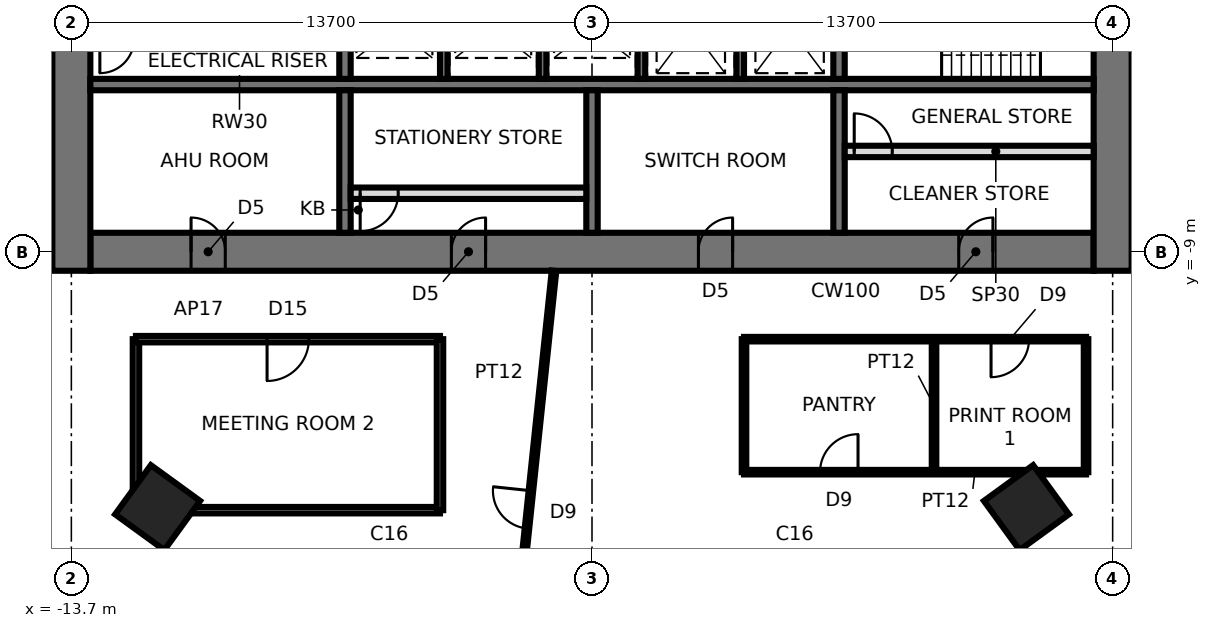
"""IFC4 building model, lengths in metres.
Left out: names, types, materials, properties, quantities, classifications, styles, units other than length and angle.
Written with IfcOpenShell. Run it as: python <this file> out.ifc"""

import sys

from ifc_helpers import new_model, si_unit, direction, frame, frame_2d, origin, origin_2d, place, context, subcontext, project, spatial, rectangle, extrude, element, fill, save


model = new_model("IFC4")
c1 = context("Model", 3, precision=1e-05, world=origin(), true_north=direction((0.0, 1.0)))
c2 = subcontext(c1, "Body", "Model", "MODEL_VIEW")
j1 = project(units=[si_unit("LENGTHUNIT", "METRE"), si_unit("PLANEANGLEUNIT", "RADIAN")], contexts=[c1])
p1 = place(None, origin())
s1 = spatial("IfcSite", under=j1, at=p1, CompositionType="ELEMENT")
p2 = place(p1, origin())
s2 = spatial("IfcBuilding", under=s1, at=p2, CompositionType="ELEMENT")
p3 = place(p2, frame((0.0, 0.0, 92.4)))
s3 = spatial("IfcBuildingStorey", under=s2, at=p3, CompositionType="ELEMENT", Elevation=92.4)
for number, where, z_axis, x_axis in (
    (1, (-11.43, -15.733, 0.0), (0.0, 0.0, 1.0), (-0.588, -0.809, 0.0)),
    (2, (11.43, -15.733, 0.0), (0.0, 0.0, 1.0), (0.588, -0.809, 0.0)),
):
    element("IfcColumn", number, at=place(p3, frame(where, z_axis=z_axis, x_axis=x_axis)), inside=s3, PredefinedType="COLUMN", context=c2, shape_type="SweptSolid", body=[
        extrude(rectangle(XDim=1.6, YDim=1.6, at=origin_2d()), origin(), (0.0, 0.0, 1.0), 3.9),
    ])
p4 = place(p3, frame((-13.2, -9.0, 0.0), z_axis=(0.0, 0.0, 1.0), x_axis=(1.0, 0.0, 0.0)))
e3 = element("IfcWall", 3, at=p4, inside=s3, PredefinedType="SHEAR", context=c2, shape_type="SweptSolid", body=[
    extrude(rectangle(XDim=26.4, YDim=1.0, at=frame_2d((13.2, 0.0))), origin(), (0.0, 0.0, 1.0), 3.9),
])
p5 = place(p4, frame((2.65, 0.0, 0.0)))
e4 = element("IfcOpeningElement", 4, at=p5, cuts=e3, PredefinedType="OPENING", context=c2, shape_type="SweptSolid", body=[
    extrude(rectangle(XDim=0.9, YDim=2.1, at=frame_2d((0.45, 1.05))), frame((0.0, 0.51, 0.0), z_axis=(0.0, -1.0, 0.0), x_axis=(1.0, 0.0, 0.0)), (0.0, 0.0, 1.0), 1.02),
])
p6 = place(p4, frame((9.5, 0.0, 0.0)))
e5 = element("IfcOpeningElement", 5, at=p6, cuts=e3, PredefinedType="OPENING", context=c2, shape_type="SweptSolid", body=[
    extrude(rectangle(XDim=0.9, YDim=2.1, at=frame_2d((0.45, 1.05))), frame((0.0, 0.51, 0.0), z_axis=(0.0, -1.0, 0.0), x_axis=(1.0, 0.0, 0.0)), (0.0, 0.0, 1.0), 1.02),
])
p7 = place(p4, frame((16.0, 0.0, 0.0)))
e6 = element("IfcOpeningElement", 6, at=p7, cuts=e3, PredefinedType="OPENING", context=c2, shape_type="SweptSolid", body=[
    extrude(rectangle(XDim=0.9, YDim=2.1, at=frame_2d((0.45, 1.05))), frame((0.0, 0.51, 0.0), z_axis=(0.0, -1.0, 0.0), x_axis=(1.0, 0.0, 0.0)), (0.0, 0.0, 1.0), 1.02),
])
p8 = place(p4, frame((22.85, 0.0, 0.0)))
e7 = element("IfcOpeningElement", 7, at=p8, cuts=e3, PredefinedType="OPENING", context=c2, shape_type="SweptSolid", body=[
    extrude(rectangle(XDim=0.9, YDim=2.1, at=frame_2d((0.45, 1.05))), frame((0.0, 0.51, 0.0), z_axis=(0.0, -1.0, 0.0), x_axis=(1.0, 0.0, 0.0)), (0.0, 0.0, 1.0), 1.02),
])
p9 = place(p3, frame((13.7, -9.5, 0.0), z_axis=(0.0, 0.0, 1.0), x_axis=(0.0, 1.0, 0.0)))
e8 = element("IfcWall", 8, at=p9, inside=s3, PredefinedType="SHEAR", context=c2, shape_type="SweptSolid", body=[
    extrude(rectangle(XDim=19.0, YDim=1.0, at=frame_2d((9.5, 0.0))), origin(), (0.0, 0.0, 1.0), 3.9),
])
p10 = place(p9, frame((8.6, 0.0, 0.0)))
e9 = element("IfcOpeningElement", 9, at=p10, cuts=e8, PredefinedType="OPENING", context=c2, shape_type="SweptSolid", body=[
    extrude(rectangle(XDim=1.8, YDim=2.4, at=frame_2d((0.9, 1.2))), frame((0.0, 0.51, 0.0), z_axis=(0.0, -1.0, 0.0), x_axis=(1.0, 0.0, 0.0)), (0.0, 0.0, 1.0), 1.02),
])
p11 = place(p3, frame((-13.7, 9.5, 0.0), z_axis=(0.0, 0.0, 1.0), x_axis=(0.0, -1.0, 0.0)))
e10 = element("IfcWall", 10, at=p11, inside=s3, PredefinedType="SHEAR", context=c2, shape_type="SweptSolid", body=[
    extrude(rectangle(XDim=19.0, YDim=1.0, at=frame_2d((9.5, 0.0))), origin(), (0.0, 0.0, 1.0), 3.9),
])
p12 = place(p11, frame((8.6, 0.0, 0.0)))
e11 = element("IfcOpeningElement", 11, at=p12, cuts=e10, PredefinedType="OPENING", context=c2, shape_type="SweptSolid", body=[
    extrude(rectangle(XDim=1.8, YDim=2.4, at=frame_2d((0.9, 1.2))), frame((0.0, 0.51, 0.0), z_axis=(0.0, -1.0, 0.0), x_axis=(1.0, 0.0, 0.0)), (0.0, 0.0, 1.0), 1.02),
])
p13 = place(p3, frame((-13.2, -4.6, 0.0), z_axis=(0.0, 0.0, 1.0), x_axis=(1.0, 0.0, 0.0)))
e12 = element("IfcWall", 12, at=p13, inside=s3, PredefinedType="SHEAR", context=c2, shape_type="SweptSolid", body=[
    extrude(rectangle(XDim=26.4, YDim=0.3, at=frame_2d((13.2, 0.0))), origin(), (0.0, 0.0, 1.0), 3.9),
])
p14 = place(p3, frame((-6.5, -1.75, 0.0), z_axis=(0.0, 0.0, 1.0), x_axis=(0.0, -1.0, 0.0)))
e13 = element("IfcWall", 13, at=p14, inside=s3, PredefinedType="SHEAR", context=c2, shape_type="SweptSolid", body=[
    extrude(rectangle(XDim=2.7, YDim=0.3, at=frame_2d((1.35, 0.0))), origin(), (0.0, 0.0, 1.0), 3.9),
])
p15 = place(p3, frame((-6.5, -4.75, 0.0), z_axis=(0.0, 0.0, 1.0), x_axis=(0.0, -1.0, 0.0)))
e14 = element("IfcWall", 14, at=p15, inside=s3, PredefinedType="SHEAR", context=c2, shape_type="SweptSolid", body=[
    extrude(rectangle(XDim=3.75, YDim=0.3, at=frame_2d((1.875, 0.0))), origin(), (0.0, 0.0, 1.0), 3.9),
])
p16 = place(p3, frame((6.5, -1.75, 0.0), z_axis=(0.0, 0.0, 1.0), x_axis=(0.0, -1.0, 0.0)))
e15 = element("IfcWall", 15, at=p16, inside=s3, PredefinedType="SHEAR", context=c2, shape_type="SweptSolid", body=[
    extrude(rectangle(XDim=2.7, YDim=0.3, at=frame_2d((1.35, 0.0))), origin(), (0.0, 0.0, 1.0), 3.9),
])
p17 = place(p3, frame((6.5, -4.75, 0.0), z_axis=(0.0, 0.0, 1.0), x_axis=(0.0, -1.0, 0.0)))
e16 = element("IfcWall", 16, at=p17, inside=s3, PredefinedType="SHEAR", context=c2, shape_type="SweptSolid", body=[
    extrude(rectangle(XDim=3.75, YDim=0.3, at=frame_2d((1.875, 0.0))), origin(), (0.0, 0.0, 1.0), 3.9),
])
for number, where, z_axis, x_axis in (
    (17, (-3.9, -1.75, 0.0), (0.0, 0.0, 1.0), (0.0, -1.0, 0.0)),
    (18, (-1.3, -1.75, 0.0), (0.0, 0.0, 1.0), (0.0, -1.0, 0.0)),
    (19, (1.3, -1.75, 0.0), (0.0, 0.0, 1.0), (0.0, -1.0, 0.0)),
    (20, (3.9, -1.75, 0.0), (0.0, 0.0, 1.0), (0.0, -1.0, 0.0)),
):
    element("IfcWall", number, at=place(p3, frame(where, z_axis=z_axis, x_axis=x_axis)), inside=s3, PredefinedType="SHEAR", context=c2, shape_type="SweptSolid", body=[
        extrude(rectangle(XDim=2.7, YDim=0.2, at=frame_2d((1.35, 0.0))), origin(), (0.0, 0.0, 1.0), 3.9),
    ])
p18 = place(p3, frame((0.0, -4.75, 0.0), z_axis=(0.0, 0.0, 1.0), x_axis=(0.0, -1.0, 0.0)))
e21 = element("IfcWall", 21, at=p18, inside=s3, PredefinedType="SHEAR", context=c2, shape_type="SweptSolid", body=[
    extrude(rectangle(XDim=3.75, YDim=0.3, at=frame_2d((1.875, 0.0))), origin(), (0.0, 0.0, 1.0), 3.9),
])
p19 = place(p3, frame((-6.35, -7.46, 0.0), z_axis=(0.0, 0.0, 1.0), x_axis=(1.0, 0.0, 0.0)))
e22 = element("IfcWall", 22, at=p19, inside=s3, PredefinedType="PARTITIONING", context=c2, shape_type="SweptSolid", body=[
    extrude(rectangle(XDim=6.2, YDim=0.3, at=frame_2d((3.1, 0.0))), origin(), (0.0, 0.0, 1.0), 3.74),
])
p20 = place(p19, frame((0.25, 0.0, 0.0)))
e23 = element("IfcOpeningElement", 23, at=p20, cuts=e22, PredefinedType="OPENING", context=c2, shape_type="SweptSolid", body=[
    extrude(rectangle(XDim=1.0, YDim=2.4, at=frame_2d((0.5, 1.2))), frame((0.0, 0.16, 0.0), z_axis=(0.0, -1.0, 0.0), x_axis=(1.0, 0.0, 0.0)), (0.0, 0.0, 1.0), 0.32),
])
p21 = place(p3, frame((6.65, -6.36, 0.0), z_axis=(0.0, 0.0, 1.0), x_axis=(1.0, 0.0, 0.0)))
e24 = element("IfcWall", 24, at=p21, inside=s3, PredefinedType="PARTITIONING", context=c2, shape_type="SweptSolid", body=[
    extrude(rectangle(XDim=6.55, YDim=0.3, at=frame_2d((3.275, 0.0))), origin(), (0.0, 0.0, 1.0), 3.74),
])
p22 = place(p21, frame((0.25, 0.0, 0.0)))
e25 = element("IfcOpeningElement", 25, at=p22, cuts=e24, PredefinedType="OPENING", context=c2, shape_type="SweptSolid", body=[
    extrude(rectangle(XDim=1.0, YDim=2.4, at=frame_2d((0.5, 1.2))), frame((0.0, 0.16, 0.0), z_axis=(0.0, -1.0, 0.0), x_axis=(1.0, 0.0, 0.0)), (0.0, 0.0, 1.0), 0.32),
])
p23 = place(p3, frame((-12.0, -15.8, 0.0), z_axis=(0.0, 0.0, 1.0), x_axis=(0.0, 1.0, 0.0)))
e26 = element("IfcWall", 26, at=p23, inside=s3, PredefinedType="PARTITIONING", context=c2, shape_type="SweptSolid", body=[
    extrude(rectangle(XDim=4.5, YDim=0.17, at=frame_2d((2.25, 0.0))), origin(), (0.0, 0.0, 1.0), 3.74),
])
p24 = place(p3, frame((-12.0, -11.3, 0.0), z_axis=(0.0, 0.0, 1.0), x_axis=(1.0, 0.0, 0.0)))
e27 = element("IfcWall", 27, at=p24, inside=s3, PredefinedType="PARTITIONING", context=c2, shape_type="SweptSolid", body=[
    extrude(rectangle(XDim=8.0, YDim=0.17, at=frame_2d((4.0, 0.0))), origin(), (0.0, 0.0, 1.0), 3.74),
])
p25 = place(p24, frame((3.45, 0.0, 0.0)))
e28 = element("IfcOpeningElement", 28, at=p25, cuts=e27, PredefinedType="OPENING", context=c2, shape_type="SweptSolid", body=[
    extrude(rectangle(XDim=1.1, YDim=2.4, at=frame_2d((0.55, 1.2))), frame((0.0, 0.095, 0.0), z_axis=(0.0, -1.0, 0.0), x_axis=(1.0, 0.0, 0.0)), (0.0, 0.0, 1.0), 0.19),
])
p26 = place(p3, frame((-4.0, -15.8, 0.0), z_axis=(0.0, 0.0, 1.0), x_axis=(-1.0, 0.0, 0.0)))
e29 = element("IfcWall", 29, at=p26, inside=s3, PredefinedType="PARTITIONING", context=c2, shape_type="SweptSolid", body=[
    extrude(rectangle(XDim=8.0, YDim=0.17, at=frame_2d((4.0, 0.0))), origin(), (0.0, 0.0, 1.0), 3.74),
])
p27 = place(p3, frame((-4.0, -11.3, 0.0), z_axis=(0.0, 0.0, 1.0), x_axis=(0.0, -1.0, 0.0)))
e30 = element("IfcWall", 30, at=p27, inside=s3, PredefinedType="PARTITIONING", context=c2, shape_type="SweptSolid", body=[
    extrude(rectangle(XDim=4.5, YDim=0.17, at=frame_2d((2.25, 0.0))), origin(), (0.0, 0.0, 1.0), 3.74),
])
p28 = place(p3, frame((-2.314, -22.021, 0.0), z_axis=(0.0, 0.0, 1.0), x_axis=(0.104523271081, 0.994522441075, 0.0)))
e31 = element("IfcWall", 31, at=p28, inside=s3, PredefinedType="PARTITIONING", context=c2, shape_type="SweptSolid", body=[
    extrude(rectangle(XDim=12.59, YDim=0.12, at=frame_2d((6.295, 0.0))), origin(), (0.0, 0.0, 1.0), 3.74),
])
p29 = place(p28, frame((5.77, 0.0, 0.0)))
e32 = element("IfcOpeningElement", 32, at=p29, cuts=e31, PredefinedType="OPENING", context=c2, shape_type="SweptSolid", body=[
    extrude(rectangle(XDim=1.0, YDim=2.4, at=frame_2d((0.5, 1.2))), frame((0.0, 0.07, 0.0), z_axis=(0.0, -1.0, 0.0), x_axis=(1.0, 0.0, 0.0)), (0.0, 0.0, 1.0), 0.14),
])
p30 = place(p3, frame((4.0, -14.8, 0.0), z_axis=(0.0, 0.0, 1.0), x_axis=(0.0, 1.0, 0.0)))
e33 = element("IfcWall", 33, at=p30, inside=s3, PredefinedType="PARTITIONING", context=c2, shape_type="SweptSolid", body=[
    extrude(rectangle(XDim=3.5, YDim=0.12, at=frame_2d((1.75, 0.0))), origin(), (0.0, 0.0, 1.0), 3.74),
])
p31 = place(p3, frame((13.0, -14.8, 0.0), z_axis=(0.0, 0.0, 1.0), x_axis=(-1.0, 0.0, 0.0)))
e34 = element("IfcWall", 34, at=p31, inside=s3, PredefinedType="PARTITIONING", context=c2, shape_type="SweptSolid", body=[
    extrude(rectangle(XDim=9.0, YDim=0.12, at=frame_2d((4.5, 0.0))), origin(), (0.0, 0.0, 1.0), 3.74),
])
p32 = place(p31, frame((6.0, 0.0, 0.0)))
e35 = element("IfcOpeningElement", 35, at=p32, cuts=e34, PredefinedType="OPENING", context=c2, shape_type="SweptSolid", body=[
    extrude(rectangle(XDim=1.0, YDim=2.4, at=frame_2d((0.5, 1.2))), frame((0.0, 0.07, 0.0), z_axis=(0.0, -1.0, 0.0), x_axis=(1.0, 0.0, 0.0)), (0.0, 0.0, 1.0), 0.14),
])
p33 = place(p3, frame((9.0, -11.3, 0.0), z_axis=(0.0, 0.0, 1.0), x_axis=(0.0, -1.0, 0.0)))
e36 = element("IfcWall", 36, at=p33, inside=s3, PredefinedType="PARTITIONING", context=c2, shape_type="SweptSolid", body=[
    extrude(rectangle(XDim=3.5, YDim=0.12, at=frame_2d((1.75, 0.0))), origin(), (0.0, 0.0, 1.0), 3.74),
])
p34 = place(p3, frame((4.0, -11.3, 0.0), z_axis=(0.0, 0.0, 1.0), x_axis=(1.0, 0.0, 0.0)))
e37 = element("IfcWall", 37, at=p34, inside=s3, PredefinedType="PARTITIONING", context=c2, shape_type="SweptSolid", body=[
    extrude(rectangle(XDim=9.0, YDim=0.12, at=frame_2d((4.5, 0.0))), origin(), (0.0, 0.0, 1.0), 3.74),
])
p35 = place(p34, frame((6.5, 0.0, 0.0)))
e38 = element("IfcOpeningElement", 38, at=p35, cuts=e37, PredefinedType="OPENING", context=c2, shape_type="SweptSolid", body=[
    extrude(rectangle(XDim=1.0, YDim=2.4, at=frame_2d((0.5, 1.2))), frame((0.0, 0.07, 0.0), z_axis=(0.0, -1.0, 0.0), x_axis=(1.0, 0.0, 0.0)), (0.0, 0.0, 1.0), 0.14),
])
p36 = place(p3, frame((13.0, -11.3, 0.0), z_axis=(0.0, 0.0, 1.0), x_axis=(0.0, -1.0, 0.0)))
e39 = element("IfcWall", 39, at=p36, inside=s3, PredefinedType="PARTITIONING", context=c2, shape_type="SweptSolid", body=[
    extrude(rectangle(XDim=3.5, YDim=0.12, at=frame_2d((1.75, 0.0))), origin(), (0.0, 0.0, 1.0), 3.74),
])
p37 = place(p5, origin())
e40 = element("IfcDoor", 40, at=p37, inside=s3, OperationType="SINGLE_SWING_LEFT", PredefinedType="DOOR", context=c2, shape_type="SweptSolid", body=[
    extrude(rectangle(XDim=0.82, YDim=2.06, at=frame_2d((0.45, 1.03))), frame((0.0, 0.025, 0.0), z_axis=(0.0, -1.0, 0.0), x_axis=(1.0, 0.0, 0.0)), (0.0, 0.0, 1.0), 0.05),
    extrude(rectangle(XDim=0.04, YDim=2.1, at=frame_2d((0.02, 1.05))), frame((0.0, 0.25, 0.0), z_axis=(0.0, -1.0, 0.0), x_axis=(1.0, 0.0, 0.0)), (0.0, 0.0, 1.0), 0.5),
    extrude(rectangle(XDim=0.04, YDim=2.1, at=frame_2d((0.88, 1.05))), frame((0.0, 0.25, 0.0), z_axis=(0.0, -1.0, 0.0), x_axis=(1.0, 0.0, 0.0)), (0.0, 0.0, 1.0), 0.5),
    extrude(rectangle(XDim=0.82, YDim=0.04, at=frame_2d((0.45, 2.08))), frame((0.0, 0.25, 0.0), z_axis=(0.0, -1.0, 0.0), x_axis=(1.0, 0.0, 0.0)), (0.0, 0.0, 1.0), 0.5),
])
fill(e4, e40)
p38 = place(p6, origin())
e41 = element("IfcDoor", 41, at=p38, inside=s3, OperationType="SINGLE_SWING_RIGHT", PredefinedType="DOOR", context=c2, shape_type="SweptSolid", body=[
    extrude(rectangle(XDim=0.82, YDim=2.06, at=frame_2d((0.45, 1.03))), frame((0.0, 0.025, 0.0), z_axis=(0.0, -1.0, 0.0), x_axis=(1.0, 0.0, 0.0)), (0.0, 0.0, 1.0), 0.05),
    extrude(rectangle(XDim=0.04, YDim=2.1, at=frame_2d((0.02, 1.05))), frame((0.0, 0.25, 0.0), z_axis=(0.0, -1.0, 0.0), x_axis=(1.0, 0.0, 0.0)), (0.0, 0.0, 1.0), 0.5),
    extrude(rectangle(XDim=0.04, YDim=2.1, at=frame_2d((0.88, 1.05))), frame((0.0, 0.25, 0.0), z_axis=(0.0, -1.0, 0.0), x_axis=(1.0, 0.0, 0.0)), (0.0, 0.0, 1.0), 0.5),
    extrude(rectangle(XDim=0.82, YDim=0.04, at=frame_2d((0.45, 2.08))), frame((0.0, 0.25, 0.0), z_axis=(0.0, -1.0, 0.0), x_axis=(1.0, 0.0, 0.0)), (0.0, 0.0, 1.0), 0.5),
])
fill(e5, e41)
p39 = place(p7, origin())
e42 = element("IfcDoor", 42, at=p39, inside=s3, OperationType="SINGLE_SWING_RIGHT", PredefinedType="DOOR", context=c2, shape_type="SweptSolid", body=[
    extrude(rectangle(XDim=0.82, YDim=2.06, at=frame_2d((0.45, 1.03))), frame((0.0, 0.025, 0.0), z_axis=(0.0, -1.0, 0.0), x_axis=(1.0, 0.0, 0.0)), (0.0, 0.0, 1.0), 0.05),
    extrude(rectangle(XDim=0.04, YDim=2.1, at=frame_2d((0.02, 1.05))), frame((0.0, 0.25, 0.0), z_axis=(0.0, -1.0, 0.0), x_axis=(1.0, 0.0, 0.0)), (0.0, 0.0, 1.0), 0.5),
    extrude(rectangle(XDim=0.04, YDim=2.1, at=frame_2d((0.88, 1.05))), frame((0.0, 0.25, 0.0), z_axis=(0.0, -1.0, 0.0), x_axis=(1.0, 0.0, 0.0)), (0.0, 0.0, 1.0), 0.5),
    extrude(rectangle(XDim=0.82, YDim=0.04, at=frame_2d((0.45, 2.08))), frame((0.0, 0.25, 0.0), z_axis=(0.0, -1.0, 0.0), x_axis=(1.0, 0.0, 0.0)), (0.0, 0.0, 1.0), 0.5),
])
fill(e6, e42)
p40 = place(p8, origin())
e43 = element("IfcDoor", 43, at=p40, inside=s3, OperationType="SINGLE_SWING_RIGHT", PredefinedType="DOOR", context=c2, shape_type="SweptSolid", body=[
    extrude(rectangle(XDim=0.82, YDim=2.06, at=frame_2d((0.45, 1.03))), frame((0.0, 0.025, 0.0), z_axis=(0.0, -1.0, 0.0), x_axis=(1.0, 0.0, 0.0)), (0.0, 0.0, 1.0), 0.05),
    extrude(rectangle(XDim=0.04, YDim=2.1, at=frame_2d((0.02, 1.05))), frame((0.0, 0.25, 0.0), z_axis=(0.0, -1.0, 0.0), x_axis=(1.0, 0.0, 0.0)), (0.0, 0.0, 1.0), 0.5),
    extrude(rectangle(XDim=0.04, YDim=2.1, at=frame_2d((0.88, 1.05))), frame((0.0, 0.25, 0.0), z_axis=(0.0, -1.0, 0.0), x_axis=(1.0, 0.0, 0.0)), (0.0, 0.0, 1.0), 0.5),
    extrude(rectangle(XDim=0.82, YDim=0.04, at=frame_2d((0.45, 2.08))), frame((0.0, 0.25, 0.0), z_axis=(0.0, -1.0, 0.0), x_axis=(1.0, 0.0, 0.0)), (0.0, 0.0, 1.0), 0.5),
])
fill(e7, e43)
p41 = place(p20, frame((1.0, 0.0, 0.0), z_axis=(0.0, 0.0, 1.0), x_axis=(-1.0, 0.0, 0.0)))
e44 = element("IfcDoor", 44, at=p41, inside=s3, OperationType="SINGLE_SWING_RIGHT", PredefinedType="DOOR", context=c2, shape_type="SweptSolid", body=[
    extrude(rectangle(XDim=1.0, YDim=2.4, at=frame_2d((0.5, 1.2))), frame((0.0, 0.025, 0.0), z_axis=(0.0, -1.0, 0.0), x_axis=(1.0, 0.0, 0.0)), (0.0, 0.0, 1.0), 0.05),
])
fill(e23, e44)
p42 = place(p22, origin())
e45 = element("IfcDoor", 45, at=p42, inside=s3, OperationType="SINGLE_SWING_LEFT", PredefinedType="DOOR", context=c2, shape_type="SweptSolid", body=[
    extrude(rectangle(XDim=1.0, YDim=2.4, at=frame_2d((0.5, 1.2))), frame((0.0, 0.025, 0.0), z_axis=(0.0, -1.0, 0.0), x_axis=(1.0, 0.0, 0.0)), (0.0, 0.0, 1.0), 0.05),
])
fill(e25, e45)
p43 = place(p25, frame((1.1, 0.0, 0.0), z_axis=(0.0, 0.0, 1.0), x_axis=(-1.0, 0.0, 0.0)))
e46 = element("IfcDoor", 46, at=p43, inside=s3, OperationType="SINGLE_SWING_RIGHT", PredefinedType="DOOR", context=c2, shape_type="SweptSolid", body=[
    extrude(rectangle(XDim=1.1, YDim=2.4, at=frame_2d((0.55, 1.2))), frame((0.0, 0.025, 0.0), z_axis=(0.0, -1.0, 0.0), x_axis=(1.0, 0.0, 0.0)), (0.0, 0.0, 1.0), 0.05),
])
fill(e28, e46)
p44 = place(p32, frame((1.0, 0.0, 0.0), z_axis=(0.0, 0.0, 1.0), x_axis=(-1.0, 0.0, 0.0)))
e47 = element("IfcDoor", 47, at=p44, inside=s3, OperationType="SINGLE_SWING_RIGHT", PredefinedType="DOOR", context=c2, shape_type="SweptSolid", body=[
    extrude(rectangle(XDim=1.0, YDim=2.4, at=frame_2d((0.5, 1.2))), frame((0.0, 0.025, 0.0), z_axis=(0.0, -1.0, 0.0), x_axis=(1.0, 0.0, 0.0)), (0.0, 0.0, 1.0), 0.05),
])
fill(e35, e47)
p45 = place(p35, frame((1.0, 0.0, 0.0), z_axis=(0.0, 0.0, 1.0), x_axis=(-1.0, 0.0, 0.0)))
e48 = element("IfcDoor", 48, at=p45, inside=s3, OperationType="SINGLE_SWING_RIGHT", PredefinedType="DOOR", context=c2, shape_type="SweptSolid", body=[
    extrude(rectangle(XDim=1.0, YDim=2.4, at=frame_2d((0.5, 1.2))), frame((0.0, 0.025, 0.0), z_axis=(0.0, -1.0, 0.0), x_axis=(1.0, 0.0, 0.0)), (0.0, 0.0, 1.0), 0.05),
])
fill(e38, e48)
p46 = place(p29, origin())
e49 = element("IfcDoor", 49, at=p46, inside=s3, OperationType="SINGLE_SWING_RIGHT", PredefinedType="DOOR", context=c2, shape_type="SweptSolid", body=[
    extrude(rectangle(XDim=1.0, YDim=2.4, at=frame_2d((0.5, 1.2))), frame((0.0, 0.025, 0.0), z_axis=(0.0, -1.0, 0.0), x_axis=(1.0, 0.0, 0.0)), (0.0, 0.0, 1.0), 0.05),
])
fill(e32, e49)
save(model, sys.argv[1])
